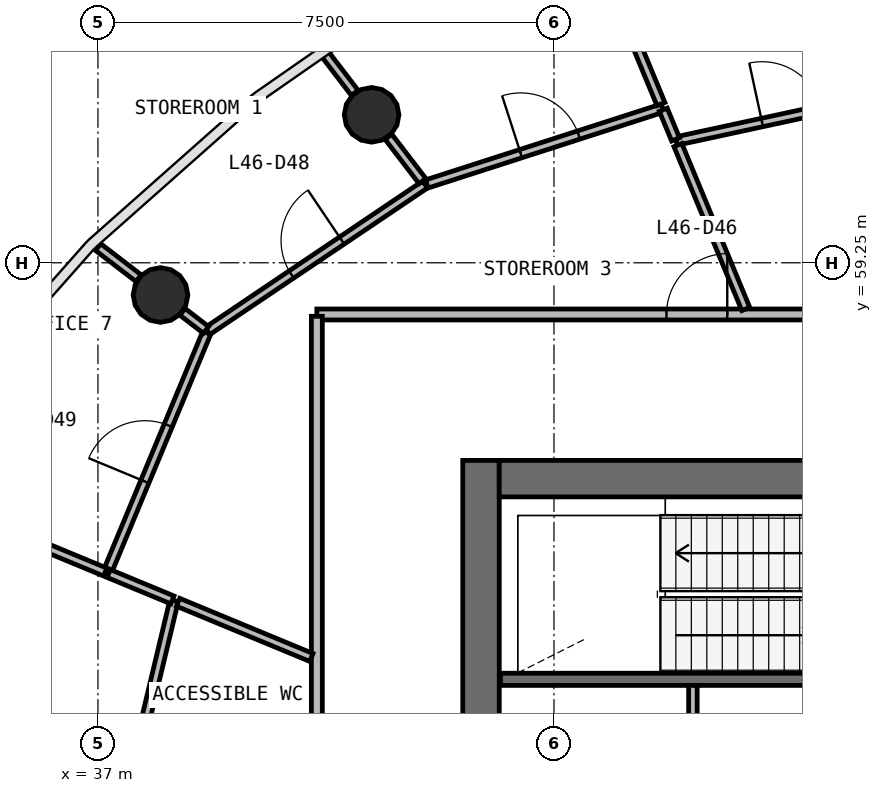
"""IFC4 building model, lengths in metres.
Left out: names, types, materials, properties, quantities, classifications, styles, units other than length and angle.
Written with IfcOpenShell. Run it as: python <this file> out.ifc"""

import sys

from ifc_helpers import new_model, si_unit, direction, frame, frame_2d, origin, origin_2d, place, context, subcontext, project, spatial, rectangle, circle, extrude, source, transform, mapped, element, fill, save


model = new_model("IFC4")
c1 = context("Model", 3, precision=1e-05, world=origin(), true_north=direction((0.0, 1.0)))
c2 = subcontext(c1, "Body", "Model", "MODEL_VIEW")
j1 = project(units=[si_unit("LENGTHUNIT", "METRE"), si_unit("PLANEANGLEUNIT", "RADIAN")], contexts=[c1])
p1 = place(None, origin())
s1 = spatial("IfcSite", under=j1, at=p1, CompositionType="ELEMENT")
p2 = place(p1, origin())
s2 = spatial("IfcBuilding", under=s1, at=p2, CompositionType="ELEMENT")
p3 = place(p2, frame((0.0, 0.0, 191.6)))
s3 = spatial("IfcBuildingStorey", under=s2, at=p3, CompositionType="ELEMENT", Elevation=191.6)
p4 = place(p3, frame((43.3, 56.0, 0.0), z_axis=(0.0, 0.0, 1.0), x_axis=(0.0, -1.0, 0.0)))
e1 = element("IfcWall", 1, at=p4, inside=s3, PredefinedType="SHEAR", context=c2, shape_type="SweptSolid", body=[
    extrude(rectangle(XDim=16.0, YDim=0.6, at=frame_2d((8.0, 0.0))), origin(), (0.0, 0.0, 1.0), 3.9),
])
p5 = place(p4, frame((7.1, 0.0, 0.0)))
e2 = element("IfcOpeningElement", 2, at=p5, cuts=e1, PredefinedType="OPENING", context=c2, shape_type="SweptSolid", body=[
    extrude(rectangle(XDim=1.8, YDim=2.1, at=frame_2d((0.9, 1.05))), frame((0.0, 0.31, 0.0), z_axis=(0.0, -1.0, 0.0), x_axis=(1.0, 0.0, 0.0)), (0.0, 0.0, 1.0), 0.62),
])
p6 = place(p3, frame((60.4, 55.7, 0.0), z_axis=(0.0, 0.0, 1.0), x_axis=(-1.0, 0.0, 0.0)))
e3 = element("IfcWall", 3, at=p6, inside=s3, PredefinedType="SHEAR", context=c2, shape_type="SweptSolid", body=[
    extrude(rectangle(XDim=16.8, YDim=0.6, at=frame_2d((8.4, 0.0))), origin(), (0.0, 0.0, 1.0), 3.9),
])
p7 = place(p6, frame((0.4, 0.0, 0.0)))
e4 = element("IfcOpeningElement", 4, at=p7, cuts=e3, PredefinedType="OPENING", context=c2, shape_type="SweptSolid", body=[
    extrude(rectangle(XDim=1.1, YDim=2.1, at=frame_2d((0.55, 1.05))), frame((0.0, 0.31, 0.0), z_axis=(0.0, -1.0, 0.0), x_axis=(1.0, 0.0, 0.0)), (0.0, 0.0, 1.0), 0.62),
])
p8 = place(p6, frame((10.3, 0.0, 0.0)))
e5 = element("IfcOpeningElement", 5, at=p8, cuts=e3, PredefinedType="OPENING", context=c2, shape_type="SweptSolid", body=[
    extrude(rectangle(XDim=1.2, YDim=2.1, at=frame_2d((0.6, 1.05))), frame((0.0, 0.31, 0.0), z_axis=(0.0, -1.0, 0.0), x_axis=(1.0, 0.0, 0.0)), (0.0, 0.0, 1.0), 0.62),
])
p9 = place(p6, frame((7.25, 0.0, 0.0)))
e6 = element("IfcOpeningElement", 6, at=p9, cuts=e3, PredefinedType="OPENING", context=c2, shape_type="SweptSolid", body=[
    extrude(rectangle(XDim=1.1, YDim=2.1, at=frame_2d((0.55, 1.05))), frame((0.0, 0.31, 0.0), z_axis=(0.0, -1.0, 0.0), x_axis=(1.0, 0.0, 0.0)), (0.0, 0.0, 1.0), 0.62),
])
m1 = source(origin(), c2, "Body", "SweptSolid", [
    extrude(circle(Radius=0.45, at=origin_2d()), origin(), (0.0, 0.0, 1.0), 3.9),
])
for number, where, z_axis, x_axis in (
    (7, (41.501, 61.683, 0.0), (0.0, 0.0, 1.0), (1.0, 0.0, 0.0)),
    (8, (38.029, 58.72, 0.0), (0.0, 0.0, 1.0), (1.0, 0.0, 0.0)),
):
    element("IfcColumn", number, at=place(p3, frame(where, z_axis=z_axis, x_axis=x_axis)), inside=s3, PredefinedType="COLUMN", context=c2, shape_type="MappedRepresentation", body=[
        mapped(m1, transform((0.0, 0.0, 0.0), scale=1.0)),
    ])
p10 = place(p3, frame((43.62, 52.4, 0.0), z_axis=(0.0, 0.0, 1.0), x_axis=(1.0, 0.0, 0.0)))
e9 = element("IfcWall", 9, at=p10, inside=s3, PredefinedType="SOLIDWALL", context=c2, shape_type="SweptSolid", body=[
    extrude(rectangle(XDim=6.78, YDim=0.2, at=frame_2d((3.39, 0.0))), origin(), (0.0, 0.0, 1.0), 3.58),
])
p11 = place(p3, frame((40.6, 58.4, 0.0), z_axis=(0.0, 0.0, 1.0), x_axis=(1.0, 0.0, 0.0)))
e10 = element("IfcWall", 10, at=p11, inside=s3, PredefinedType="PARTITIONING", context=c2, shape_type="SweptSolid", body=[
    extrude(rectangle(XDim=22.8, YDim=0.18, at=frame_2d((11.4, 0.0))), origin(), (0.0, 0.0, 1.0), 2.88),
])
p12 = place(p11, frame((12.95, 0.0, 0.0)))
e11 = element("IfcOpeningElement", 11, at=p12, cuts=e10, PredefinedType="OPENING", context=c2, shape_type="SweptSolid", body=[
    extrude(rectangle(XDim=1.0, YDim=2.1, at=frame_2d((0.5, 1.05))), frame((0.0, 0.1, 0.0), z_axis=(0.0, -1.0, 0.0), x_axis=(1.0, 0.0, 0.0)), (0.0, 0.0, 1.0), 0.2),
])
p13 = place(p11, frame((10.95, 0.0, 0.0)))
e12 = element("IfcOpeningElement", 12, at=p13, cuts=e10, PredefinedType="OPENING", context=c2, shape_type="SweptSolid", body=[
    extrude(rectangle(XDim=1.0, YDim=2.1, at=frame_2d((0.5, 1.05))), frame((0.0, 0.1, 0.0), z_axis=(0.0, -1.0, 0.0), x_axis=(1.0, 0.0, 0.0)), (0.0, 0.0, 1.0), 0.2),
])
p14 = place(p11, frame((5.75, 0.0, 0.0)))
e13 = element("IfcOpeningElement", 13, at=p14, cuts=e10, PredefinedType="OPENING", context=c2, shape_type="SweptSolid", body=[
    extrude(rectangle(XDim=1.0, YDim=2.1, at=frame_2d((0.5, 1.05))), frame((0.0, 0.1, 0.0), z_axis=(0.0, -1.0, 0.0), x_axis=(1.0, 0.0, 0.0)), (0.0, 0.0, 1.0), 0.2),
])
p15 = place(p3, frame((40.6, 37.63, 0.0), z_axis=(0.0, 0.0, 1.0), x_axis=(0.0, 1.0, 0.0)))
e14 = element("IfcWall", 14, at=p15, inside=s3, PredefinedType="PARTITIONING", context=c2, shape_type="SweptSolid", body=[
    extrude(rectangle(XDim=20.74, YDim=0.18, at=frame_2d((10.37, 0.0))), origin(), (0.0, 0.0, 1.0), 2.88),
])
p16 = place(p15, frame((12.19, 0.0, 0.0)))
e15 = element("IfcOpeningElement", 15, at=p16, cuts=e14, PredefinedType="OPENING", context=c2, shape_type="SweptSolid", body=[
    extrude(rectangle(XDim=0.9, YDim=2.1, at=frame_2d((0.45, 1.05))), frame((0.0, 0.1, 0.0), z_axis=(0.0, -1.0, 0.0), x_axis=(1.0, 0.0, 0.0)), (0.0, 0.0, 1.0), 0.2),
])
p17 = place(p15, frame((9.99, 0.0, 0.0)))
e16 = element("IfcOpeningElement", 16, at=p17, cuts=e14, PredefinedType="OPENING", context=c2, shape_type="SweptSolid", body=[
    extrude(rectangle(XDim=0.9, YDim=2.1, at=frame_2d((0.45, 1.05))), frame((0.0, 0.1, 0.0), z_axis=(0.0, -1.0, 0.0), x_axis=(1.0, 0.0, 0.0)), (0.0, 0.0, 1.0), 0.2),
])
p18 = place(p15, frame((7.69, 0.0, 0.0)))
e17 = element("IfcOpeningElement", 17, at=p18, cuts=e14, PredefinedType="OPENING", context=c2, shape_type="SweptSolid", body=[
    extrude(rectangle(XDim=1.0, YDim=2.1, at=frame_2d((0.5, 1.05))), frame((0.0, 0.1, 0.0), z_axis=(0.0, -1.0, 0.0), x_axis=(1.0, 0.0, 0.0)), (0.0, 0.0, 1.0), 0.2),
])
p19 = place(p3, frame((38.801, 58.128, 0.0), z_axis=(0.0, 0.0, 1.0), x_axis=(0.829508088587, 0.558494700932, 0.0)))
e18 = element("IfcWall", 18, at=p19, inside=s3, PredefinedType="PARTITIONING", context=c2, shape_type="SweptSolid", body=[
    extrude(rectangle(XDim=4.314, YDim=0.14, at=frame_2d((2.157, 0.0))), origin(), (0.0, 0.0, 1.0), 2.88),
])
p20 = place(p19, frame((1.664, 0.0, 0.0)))
e19 = element("IfcOpeningElement", 19, at=p20, cuts=e18, PredefinedType="OPENING", context=c2, shape_type="SweptSolid", body=[
    extrude(rectangle(XDim=1.0, YDim=2.1, at=frame_2d((0.5, 1.05))), frame((0.0, 0.08, 0.0), z_axis=(0.0, -1.0, 0.0), x_axis=(1.0, 0.0, 0.0)), (0.0, 0.0, 1.0), 0.16),
])
p21 = place(p3, frame((37.149, 54.152, 0.0), z_axis=(0.0, 0.0, 1.0), x_axis=(0.383800347623, 0.923416099689, 0.0)))
e20 = element("IfcWall", 20, at=p21, inside=s3, PredefinedType="PARTITIONING", context=c2, shape_type="SweptSolid", body=[
    extrude(rectangle(XDim=4.276, YDim=0.14, at=frame_2d((2.138, 0.0))), origin(), (0.0, 0.0, 1.0), 2.88),
])
p22 = place(p21, frame((1.626, 0.0, 0.0)))
e21 = element("IfcOpeningElement", 21, at=p22, cuts=e20, PredefinedType="OPENING", context=c2, shape_type="SweptSolid", body=[
    extrude(rectangle(XDim=1.0, YDim=2.1, at=frame_2d((0.5, 1.05))), frame((0.0, 0.08, 0.0), z_axis=(0.0, -1.0, 0.0), x_axis=(1.0, 0.0, 0.0)), (0.0, 0.0, 1.0), 0.16),
])
p23 = place(p3, frame((42.408, 60.546, 0.0), z_axis=(0.0, 0.0, 1.0), x_axis=(0.951875671907, 0.30648442902, 0.0)))
e22 = element("IfcWall", 22, at=p23, inside=s3, PredefinedType="PARTITIONING", context=c2, shape_type="SweptSolid", body=[
    extrude(rectangle(XDim=4.074, YDim=0.14, at=frame_2d((2.037, 0.0))), origin(), (0.0, 0.0, 1.0), 2.88),
])
p24 = place(p23, frame((1.624, 0.0, 0.0)))
e23 = element("IfcOpeningElement", 23, at=p24, cuts=e22, PredefinedType="OPENING", context=c2, shape_type="SweptSolid", body=[
    extrude(rectangle(XDim=1.0, YDim=2.1, at=frame_2d((0.5, 1.05))), frame((0.0, 0.08, 0.0), z_axis=(0.0, -1.0, 0.0), x_axis=(1.0, 0.0, 0.0)), (0.0, 0.0, 1.0), 0.16),
])
p25 = place(p3, frame((38.252, 53.694, 0.0), z_axis=(0.0, 0.0, 1.0), x_axis=(-0.232699959373, -0.972548574061, 0.0)))
e24 = element("IfcWall", 24, at=p25, inside=s3, PredefinedType="PARTITIONING", context=c2, shape_type="SweptSolid", body=[
    extrude(rectangle(XDim=3.842, YDim=0.14, at=frame_2d((1.921, 0.0))), origin(), (0.0, 0.0, 1.0), 2.88),
])
p26 = place(p3, frame((46.511, 61.251, 0.0), z_axis=(0.0, 0.0, 1.0), x_axis=(0.977404204457, 0.211378856818, 0.0)))
e25 = element("IfcWall", 25, at=p26, inside=s3, PredefinedType="PARTITIONING", context=c2, shape_type="SweptSolid", body=[
    extrude(rectangle(XDim=3.695, YDim=0.14, at=frame_2d((1.847, 0.0))), origin(), (0.0, 0.0, 1.0), 2.88),
])
p27 = place(p26, frame((1.445, 0.0, 0.0)))
e26 = element("IfcOpeningElement", 26, at=p27, cuts=e25, PredefinedType="OPENING", context=c2, shape_type="SweptSolid", body=[
    extrude(rectangle(XDim=1.0, YDim=2.1, at=frame_2d((0.5, 1.05))), frame((0.0, 0.08, 0.0), z_axis=(0.0, -1.0, 0.0), x_axis=(1.0, 0.0, 0.0)), (0.0, 0.0, 1.0), 0.16),
])
p28 = place(p3, frame((47.655, 58.49, 0.0), z_axis=(0.0, 0.0, 1.0), x_axis=(-0.382630142658, 0.92390160403, 0.0)))
e27 = element("IfcWall", 27, at=p28, inside=s3, PredefinedType="PARTITIONING", context=c2, shape_type="SweptSolid", body=[
    extrude(rectangle(XDim=2.918, YDim=0.14, at=frame_2d((1.459, 0.0))), origin(), (0.0, 0.0, 1.0), 2.88),
])
p29 = place(p3, frame((40.51, 52.759, 0.0), z_axis=(0.0, 0.0, 1.0), x_axis=(-0.923887665709, 0.3826637965, 0.0)))
e28 = element("IfcWall", 28, at=p29, inside=s3, PredefinedType="PARTITIONING", context=c2, shape_type="SweptSolid", body=[
    extrude(rectangle(XDim=2.373, YDim=0.14, at=frame_2d((1.187, 0.0))), origin(), (0.0, 0.0, 1.0), 2.88),
])
p30 = place(p3, frame((46.785, 50.01, 0.0), z_axis=(0.0, 0.0, 1.0), x_axis=(0.0, 1.0, 0.0)))
e29 = element("IfcWall", 29, at=p30, inside=s3, PredefinedType="PARTITIONING", context=c2, shape_type="SweptSolid", body=[
    extrude(rectangle(XDim=2.29, YDim=0.14, at=frame_2d((1.145, 0.0))), origin(), (0.0, 0.0, 1.0), 2.88),
])
p31 = place(p3, frame((37.121, 54.163, 0.0), z_axis=(0.0, 0.0, 1.0), x_axis=(-0.92388250353, 0.382676259612, 0.0)))
e30 = element("IfcWall", 30, at=p31, inside=s3, PredefinedType="PARTITIONING", context=c2, shape_type="SweptSolid", body=[
    extrude(rectangle(XDim=1.905, YDim=0.14, at=frame_2d((0.953, 0.0))), origin(), (0.0, 0.0, 1.0), 2.88),
])
p32 = place(p3, frame((46.259, 61.86, 0.0), z_axis=(0.0, 0.0, 1.0), x_axis=(-0.382713681356, 0.923867002389, 0.0)))
e31 = element("IfcWall", 31, at=p32, inside=s3, PredefinedType="PARTITIONING", context=c2, shape_type="SweptSolid", body=[
    extrude(rectangle(XDim=1.787, YDim=0.14, at=frame_2d((0.894, 0.0))), origin(), (0.0, 0.0, 1.0), 2.88),
])
p33 = place(p3, frame((38.225, 53.706, 0.0), z_axis=(0.0, 0.0, 1.0), x_axis=(-0.923851616337, 0.382750821021, 0.0)))
e32 = element("IfcWall", 32, at=p33, inside=s3, PredefinedType="PARTITIONING", context=c2, shape_type="SweptSolid", body=[
    extrude(rectangle(XDim=1.135, YDim=0.14, at=frame_2d((0.567, 0.0))), origin(), (0.0, 0.0, 1.0), 2.88),
])
p34 = place(p3, frame((42.337, 60.593, 0.0), z_axis=(0.0, 0.0, 1.0), x_axis=(-0.60883820701, 0.793294420555, 0.0)))
e33 = element("IfcWall", 33, at=p34, inside=s3, PredefinedType="PARTITIONING", context=c2, shape_type="SweptSolid", body=[
    extrude(rectangle(XDim=0.92, YDim=0.14, at=frame_2d((0.46, 0.0))), origin(), (0.0, 0.0, 1.0), 2.88),
])
p35 = place(p3, frame((37.668, 58.997, 0.0), z_axis=(0.0, 0.0, 1.0), x_axis=(-0.793390985662, 0.608712365466, 0.0)))
e34 = element("IfcWall", 34, at=p35, inside=s3, PredefinedType="PARTITIONING", context=c2, shape_type="SweptSolid", body=[
    extrude(rectangle(XDim=0.839, YDim=0.14, at=frame_2d((0.42, 0.0))), origin(), (0.0, 0.0, 1.0), 2.88),
])
p36 = place(p3, frame((41.224, 62.044, 0.0), z_axis=(0.0, 0.0, 1.0), x_axis=(-0.608908709281, 0.79324030644, 0.0)))
e35 = element("IfcWall", 35, at=p36, inside=s3, PredefinedType="PARTITIONING", context=c2, shape_type="SweptSolid", body=[
    extrude(rectangle(XDim=0.795, YDim=0.14, at=frame_2d((0.397, 0.0))), origin(), (0.0, 0.0, 1.0), 2.88),
])
p37 = place(p3, frame((46.5, 61.279, 0.0), z_axis=(0.0, 0.0, 1.0), x_axis=(-0.382447097883, 0.923977390049, 0.0)))
e36 = element("IfcWall", 36, at=p37, inside=s3, PredefinedType="PARTITIONING", context=c2, shape_type="SweptSolid", body=[
    extrude(rectangle(XDim=0.528, YDim=0.14, at=frame_2d((0.264, 0.0))), origin(), (0.0, 0.0, 1.0), 2.88),
])
p38 = place(p3, frame((38.777, 58.146, 0.0), z_axis=(0.0, 0.0, 1.0), x_axis=(-0.793236381763, 0.608913822021, 0.0)))
e37 = element("IfcWall", 37, at=p38, inside=s3, PredefinedType="PARTITIONING", context=c2, shape_type="SweptSolid", body=[
    extrude(rectangle(XDim=0.489, YDim=0.14, at=frame_2d((0.244, 0.0))), origin(), (0.0, 0.0, 1.0), 2.88),
])
m2 = source(origin(), c2, "Body", "SweptSolid", [
    extrude(rectangle(XDim=1.0, YDim=2.1, at=frame_2d((0.5, 1.05))), frame((0.0, 0.025, 0.0), z_axis=(0.0, -1.0, 0.0), x_axis=(1.0, 0.0, 0.0)), (0.0, 0.0, 1.0), 0.05),
])
p39 = place(p27, origin())
e38 = element("IfcDoor", 38, at=p39, inside=s3, OperationType="SINGLE_SWING_LEFT", PredefinedType="DOOR", context=c2, shape_type="MappedRepresentation", body=[
    mapped(m2, transform((0.0, 0.0, 0.0), scale=1.0)),
])
fill(e26, e38)
p40 = place(p14, origin())
e39 = element("IfcDoor", 39, at=p40, inside=s3, OperationType="SINGLE_SWING_RIGHT", PredefinedType="DOOR", context=c2, shape_type="MappedRepresentation", body=[
    mapped(m2, transform((0.0, 0.0, 0.0), scale=1.0)),
])
fill(e13, e39)
p41 = place(p24, origin())
e40 = element("IfcDoor", 40, at=p41, inside=s3, OperationType="SINGLE_SWING_LEFT", PredefinedType="DOOR", context=c2, shape_type="MappedRepresentation", body=[
    mapped(m2, transform((0.0, 0.0, 0.0), scale=1.0)),
])
fill(e23, e40)
p42 = place(p20, origin())
e41 = element("IfcDoor", 41, at=p42, inside=s3, OperationType="SINGLE_SWING_RIGHT", PredefinedType="DOOR", context=c2, shape_type="MappedRepresentation", body=[
    mapped(m2, transform((0.0, 0.0, 0.0), scale=1.0)),
])
fill(e19, e41)
p43 = place(p22, origin())
e42 = element("IfcDoor", 42, at=p43, inside=s3, OperationType="SINGLE_SWING_LEFT", PredefinedType="DOOR", context=c2, shape_type="MappedRepresentation", body=[
    mapped(m2, transform((0.0, 0.0, 0.0), scale=1.0)),
])
fill(e21, e42)
save(model, sys.argv[1])
